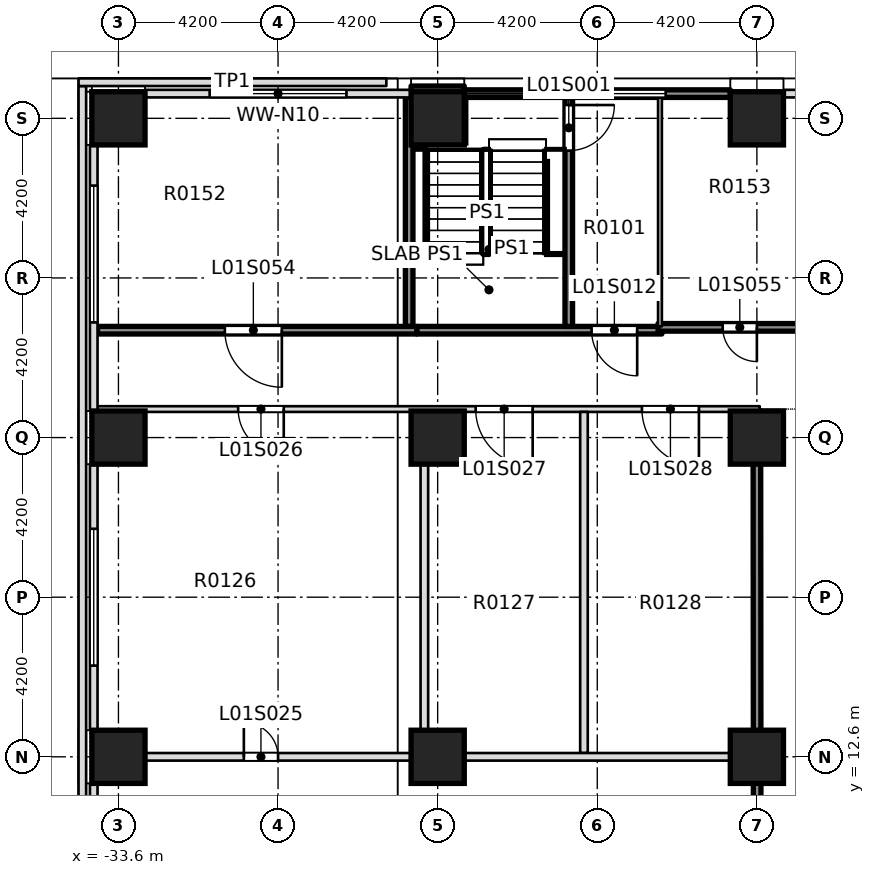
"""IFC4 building model, lengths in metres.
Left out: names, types, materials, properties, quantities, classifications, styles, units other than length and angle.
Written with IfcOpenShell. Run it as: python <this file> out.ifc"""

import sys

from ifc_helpers import new_model, si_unit, direction, frame, frame_2d, origin, origin_2d, place, context, subcontext, project, spatial, rectangle, extrude, element, fill, save


model = new_model("IFC4")
c1 = context("Model", 3, precision=1e-05, world=origin(), true_north=direction((0.0, 1.0)))
c2 = subcontext(c1, "Body", "Model", "MODEL_VIEW")
j1 = project(units=[si_unit("LENGTHUNIT", "METRE"), si_unit("PLANEANGLEUNIT", "RADIAN")], contexts=[c1])
p1 = place(None, origin())
s1 = spatial("IfcSite", under=j1, at=p1, CompositionType="ELEMENT")
p2 = place(p1, origin())
s2 = spatial("IfcBuilding", under=s1, at=p2, CompositionType="ELEMENT")
p3 = place(p2, frame((0.0, 0.0, 7.5)))
s3 = spatial("IfcBuildingStorey", under=s2, at=p3, CompositionType="ELEMENT", Elevation=7.5)
for number, where, z_axis, x_axis in (
    (1, (-25.2, 12.6, -0.4), (0.0, 0.0, 1.0), (1.0, 0.0, 0.0)),
    (2, (-16.8, 12.6, -0.4), (0.0, 0.0, 1.0), (1.0, 0.0, 0.0)),
    (3, (-16.8, 21.0, -0.4), (0.0, 0.0, 1.0), (1.0, 0.0, 0.0)),
):
    element("IfcColumn", number, at=place(p3, frame(where, z_axis=z_axis, x_axis=x_axis)), inside=s3, PredefinedType="COLUMN", context=c2, shape_type="SweptSolid", body=[
        extrude(rectangle(XDim=1.4, YDim=1.4, at=origin_2d()), origin(), (0.0, 0.0, 1.0), 5.0),
    ])
for number, where, z_axis, x_axis in (
    (4, (-33.6, 12.6, 0.0), (0.0, 0.0, 1.0), (1.0, 0.0, 0.0)),
    (5, (-33.6, 21.0, 0.0), (0.0, 0.0, 1.0), (1.0, 0.0, 0.0)),
):
    element("IfcColumn", number, at=place(p3, frame(where, z_axis=z_axis, x_axis=x_axis)), inside=s3, PredefinedType="COLUMN", context=c2, shape_type="SweptSolid", body=[
        extrude(rectangle(XDim=1.4, YDim=1.4, at=origin_2d()), origin(), (0.0, 0.0, 1.0), 4.6),
    ])
p4 = place(p3, frame((-25.2, 21.0, 0.0), z_axis=(0.0, 0.0, 1.0), x_axis=(1.0, 0.0, 0.0)))
e6 = element("IfcColumn", 6, at=p4, inside=s3, PredefinedType="COLUMN", context=c2, shape_type="SweptSolid", body=[
    extrude(rectangle(XDim=1.4, YDim=1.4, at=origin_2d()), origin(), (0.0, 0.0, 1.0), 5.0),
])
p5 = place(p3, frame((-33.6, 29.4, 0.0), z_axis=(0.0, 0.0, 1.0), x_axis=(1.0, 0.0, 0.0)))
e7 = element("IfcColumn", 7, at=p5, inside=s3, PredefinedType="COLUMN", context=c2, shape_type="SweptSolid", body=[
    extrude(rectangle(XDim=1.4, YDim=1.4, at=origin_2d()), origin(), (0.0, 0.0, 1.0), 4.6),
])
for number, where, z_axis, x_axis in (
    (8, (-25.2, 29.4, 0.0), (0.0, 0.0, 1.0), (1.0, 0.0, 0.0)),
    (9, (-16.8, 29.4, 0.0), (0.0, 0.0, 1.0), (1.0, 0.0, 0.0)),
):
    element("IfcColumn", number, at=place(p3, frame(where, z_axis=z_axis, x_axis=x_axis)), inside=s3, PredefinedType="COLUMN", context=c2, shape_type="SweptSolid", body=[
        extrude(rectangle(XDim=1.4, YDim=1.4, at=origin_2d()), origin(), (0.0, 0.0, 1.0), 5.0),
    ])
p6 = place(p3, frame((-34.55, -30.25, 5.0), z_axis=(0.0, 0.0, 1.0), x_axis=(0.0, 1.0, 0.0)))
e10 = element("IfcWall", 10, at=p6, inside=s3, PredefinedType="PARAPET", context=c2, shape_type="SweptSolid", body=[
    extrude(rectangle(XDim=60.5, YDim=0.2, at=frame_2d((30.25, 0.0))), origin(), (0.0, 0.0, 1.0), 1.2),
])
p7 = place(p3, frame((-34.65, 30.35, 5.0), z_axis=(0.0, 0.0, 1.0), x_axis=(1.0, 0.0, 0.0)))
e11 = element("IfcWall", 11, at=p7, inside=s3, PredefinedType="PARAPET", context=c2, shape_type="SweptSolid", body=[
    extrude(rectangle(XDim=8.1, YDim=0.2, at=frame_2d((4.05, 0.0))), origin(), (0.0, 0.0, 1.0), 1.2),
])
p8 = place(p3, frame((-34.15, 12.6, 0.0), z_axis=(0.0, 0.0, 1.0), x_axis=(1.0, 0.0, 0.0)))
e12 = element("IfcWall", 12, at=p8, inside=s3, PredefinedType="PARTITIONING", context=c2, shape_type="SweptSolid", body=[
    extrude(rectangle(XDim=1.25, YDim=0.2, at=frame_2d((0.625, 0.0))), origin(), (0.0, 0.0, 1.0), 4.6),
])
p9 = place(p3, frame((-34.15, 21.75, 0.0), z_axis=(0.0, 0.0, 1.0), x_axis=(1.0, 0.0, 0.0)))
e13 = element("IfcWall", 13, at=p9, inside=s3, PredefinedType="PARTITIONING", context=c2, shape_type="SweptSolid", body=[
    extrude(rectangle(XDim=17.425, YDim=0.15, at=frame_2d((8.712, 0.0))), origin(), (0.0, 0.0, 1.0), 4.6),
])
p10 = place(p9, frame((3.7, 0.0, 0.0)))
e14 = element("IfcOpeningElement", 14, at=p10, cuts=e13, PredefinedType="OPENING", context=c2, shape_type="SweptSolid", body=[
    extrude(rectangle(XDim=1.2, YDim=2.1, at=frame_2d((0.6, 1.05))), frame((0.0, 0.085, 0.0), z_axis=(0.0, -1.0, 0.0), x_axis=(1.0, 0.0, 0.0)), (0.0, 0.0, 1.0), 0.17),
])
p11 = place(p9, frame((9.95, 0.0, 0.0)))
e15 = element("IfcOpeningElement", 15, at=p11, cuts=e13, PredefinedType="OPENING", context=c2, shape_type="SweptSolid", body=[
    extrude(rectangle(XDim=1.5, YDim=2.1, at=frame_2d((0.75, 1.05))), frame((0.0, 0.085, 0.0), z_axis=(0.0, -1.0, 0.0), x_axis=(1.0, 0.0, 0.0)), (0.0, 0.0, 1.0), 0.17),
])
p12 = place(p9, frame((14.325, 0.0, 0.0)))
e16 = element("IfcOpeningElement", 16, at=p12, cuts=e13, PredefinedType="OPENING", context=c2, shape_type="SweptSolid", body=[
    extrude(rectangle(XDim=1.5, YDim=2.1, at=frame_2d((0.75, 1.05))), frame((0.0, 0.085, 0.0), z_axis=(0.0, -1.0, 0.0), x_axis=(1.0, 0.0, 0.0)), (0.0, 0.0, 1.0), 0.17),
])
p13 = place(p3, frame((-25.75, 23.825, 0.0), z_axis=(0.0, 0.0, 1.0), x_axis=(1.0, 0.0, 0.0)))
e17 = element("IfcWall", 17, at=p13, inside=s3, PredefinedType="SOLIDWALL", context=c2, shape_type="SweptSolid", body=[
    extrude(rectangle(XDim=6.45, YDim=0.2, at=frame_2d((3.225, 0.0))), origin(), (0.0, 0.0, 1.0), 4.6),
])
p14 = place(p13, frame((4.6, 0.0, 0.0)))
e18 = element("IfcOpeningElement", 18, at=p14, cuts=e17, PredefinedType="OPENING", context=c2, shape_type="SweptSolid", body=[
    extrude(rectangle(XDim=1.2, YDim=2.1, at=frame_2d((0.6, 1.05))), frame((0.0, 0.11, 0.0), z_axis=(0.0, -1.0, 0.0), x_axis=(1.0, 0.0, 0.0)), (0.0, 0.0, 1.0), 0.22),
])
p15 = place(p3, frame((-19.4, 23.9, 0.0), z_axis=(0.0, 0.0, 1.0), x_axis=(1.0, 0.0, 0.0)))
e19 = element("IfcWall", 19, at=p15, inside=s3, PredefinedType="SOLIDWALL", context=c2, shape_type="SweptSolid", body=[
    extrude(rectangle(XDim=4.3, YDim=0.2, at=frame_2d((2.15, 0.0))), origin(), (0.0, 0.0, 1.0), 4.6),
])
p16 = place(p15, frame((1.7, 0.0, 0.0)))
e20 = element("IfcOpeningElement", 20, at=p16, cuts=e19, PredefinedType="OPENING", context=c2, shape_type="SweptSolid", body=[
    extrude(rectangle(XDim=0.9, YDim=2.1, at=frame_2d((0.45, 1.05))), frame((0.0, 0.11, 0.0), z_axis=(0.0, -1.0, 0.0), x_axis=(1.0, 0.0, 0.0)), (0.0, 0.0, 1.0), 0.22),
])
p17 = place(p3, frame((-25.55, 12.7, 0.0), z_axis=(0.0, 0.0, 1.0), x_axis=(0.0, 1.0, 0.0)))
e21 = element("IfcWall", 21, at=p17, inside=s3, PredefinedType="PARTITIONING", context=c2, shape_type="SweptSolid", body=[
    extrude(rectangle(XDim=8.975, YDim=0.2, at=frame_2d((4.488, 0.0))), origin(), (0.0, 0.0, 1.0), 4.6),
])
p18 = place(p3, frame((-21.75, 23.925, 0.0), z_axis=(0.0, 0.0, 1.0), x_axis=(0.0, 1.0, 0.0)))
e22 = element("IfcWall", 22, at=p18, inside=s3, PredefinedType="SOLIDWALL", context=c2, shape_type="SweptSolid", body=[
    extrude(rectangle(XDim=6.025, YDim=0.2, at=frame_2d((3.012, 0.0))), origin(), (0.0, 0.0, 1.0), 4.6),
])
p19 = place(p18, frame((4.625, 0.0, 0.0)))
e23 = element("IfcOpeningElement", 23, at=p19, cuts=e22, PredefinedType="OPENING", context=c2, shape_type="SweptSolid", body=[
    extrude(rectangle(XDim=1.2, YDim=2.1, at=frame_2d((0.6, 1.05))), frame((0.0, 0.11, 0.0), z_axis=(0.0, -1.0, 0.0), x_axis=(1.0, 0.0, 0.0)), (0.0, 0.0, 1.0), 0.22),
])
p20 = place(p3, frame((-21.35, 12.7, 0.0), z_axis=(0.0, 0.0, 1.0), x_axis=(0.0, 1.0, 0.0)))
e24 = element("IfcWall", 24, at=p20, inside=s3, PredefinedType="PARTITIONING", context=c2, shape_type="SweptSolid", body=[
    extrude(rectangle(XDim=8.975, YDim=0.2, at=frame_2d((4.488, 0.0))), origin(), (0.0, 0.0, 1.0), 4.6),
])
p21 = place(p3, frame((-19.35, 23.925, 0.0), z_axis=(0.0, 0.0, 1.0), x_axis=(0.0, 1.0, 0.0)))
e25 = element("IfcWall", 25, at=p21, inside=s3, PredefinedType="PARTITIONING", context=c2, shape_type="SweptSolid", body=[
    extrude(rectangle(XDim=6.025, YDim=0.1, at=frame_2d((3.012, 0.0))), origin(), (0.0, 0.0, 1.0), 4.6),
])
p22 = place(p3, frame((-16.775, -12.525, 0.0), z_axis=(0.0, 0.0, 1.0), x_axis=(-0.000727609751, 0.999999735292, 0.0)))
e26 = element("IfcWall", 26, at=p22, inside=s3, PredefinedType="SOLIDWALL", context=c2, shape_type="SweptSolid", body=[
    extrude(rectangle(XDim=34.225, YDim=0.2, at=frame_2d((17.112, 0.0))), origin(), (0.0, 0.0, 1.0), 4.6),
])
p23 = place(p22, frame((16.225, 0.0, 0.0)))
e27 = element("IfcOpeningElement", 27, at=p23, cuts=e26, PredefinedType="OPENING", context=c2, shape_type="SweptSolid", body=[
    extrude(rectangle(XDim=1.5, YDim=2.1, at=frame_2d((0.75, 1.05))), frame((0.0, 0.11, 0.0), z_axis=(0.0, -1.0, 0.0), x_axis=(1.0, 0.0, 0.0)), (0.0, 0.0, 1.0), 0.22),
])
p24 = place(p3, frame((-9.1, 30.05, 0.0), z_axis=(0.0, 0.0, 1.0), x_axis=(-1.0, 0.0, 0.0)))
e28 = element("IfcWall", 28, at=p24, inside=s3, PredefinedType="STANDARD", context=c2, shape_type="SweptSolid", body=[
    extrude(rectangle(XDim=7.0, YDim=0.2, at=frame_2d((3.5, 0.0))), origin(), (0.0, 0.0, 1.0), 4.6),
])
p25 = place(p24, frame((2.07, 0.0, 0.9)))
e29 = element("IfcOpeningElement", 29, at=p25, cuts=e28, PredefinedType="OPENING", context=c2, shape_type="SweptSolid", body=[
    extrude(rectangle(XDim=3.6, YDim=2.8, at=frame_2d((1.8, 1.4))), frame((0.0, 0.11, 0.0), z_axis=(0.0, -1.0, 0.0), x_axis=(1.0, 0.0, 0.0)), (0.0, 0.0, 1.0), 0.22),
])
p26 = place(p3, frame((-24.5, 30.05, 0.0), z_axis=(0.0, 0.0, 1.0), x_axis=(1.0, 0.0, 0.0)))
e30 = element("IfcWall", 30, at=p26, inside=s3, PredefinedType="SOLIDWALL", context=c2, shape_type="SweptSolid", body=[
    extrude(rectangle(XDim=7.0, YDim=0.2, at=frame_2d((3.5, 0.0))), origin(), (0.0, 0.0, 1.0), 4.6),
])
p27 = place(p26, frame((1.7, 0.0, 0.9)))
e31 = element("IfcOpeningElement", 31, at=p27, cuts=e30, PredefinedType="OPENING", context=c2, shape_type="SweptSolid", body=[
    extrude(rectangle(XDim=3.6, YDim=2.8, at=frame_2d((1.8, 1.4))), frame((0.0, 0.11, 0.0), z_axis=(0.0, -1.0, 0.0), x_axis=(1.0, 0.0, 0.0)), (0.0, 0.0, 1.0), 0.22),
])
p28 = place(p3, frame((-25.9, 30.05, 0.0), z_axis=(0.0, 0.0, 1.0), x_axis=(-1.0, 0.0, 0.0)))
e32 = element("IfcWall", 32, at=p28, inside=s3, PredefinedType="STANDARD", context=c2, shape_type="SweptSolid", body=[
    extrude(rectangle(XDim=7.0, YDim=0.2, at=frame_2d((3.5, 0.0))), origin(), (0.0, 0.0, 1.0), 4.6),
])
p29 = place(p28, frame((1.7, 0.0, 0.9)))
e33 = element("IfcOpeningElement", 33, at=p29, cuts=e32, PredefinedType="OPENING", context=c2, shape_type="SweptSolid", body=[
    extrude(rectangle(XDim=3.6, YDim=2.8, at=frame_2d((1.8, 1.4))), frame((0.0, 0.11, 0.0), z_axis=(0.0, -1.0, 0.0), x_axis=(1.0, 0.0, 0.0)), (0.0, 0.0, 1.0), 0.22),
])
p30 = place(p3, frame((-34.25, 28.7, 0.0), z_axis=(0.0, 0.0, 1.0), x_axis=(0.0, -1.0, 0.0)))
e34 = element("IfcWall", 34, at=p30, inside=s3, PredefinedType="STANDARD", context=c2, shape_type="SweptSolid", body=[
    extrude(rectangle(XDim=7.0, YDim=0.2, at=frame_2d((3.5, 0.0))), origin(), (0.0, 0.0, 1.0), 4.6),
])
p31 = place(p30, frame((1.07, 0.0, 0.9)))
e35 = element("IfcOpeningElement", 35, at=p31, cuts=e34, PredefinedType="OPENING", context=c2, shape_type="SweptSolid", body=[
    extrude(rectangle(XDim=3.6, YDim=2.8, at=frame_2d((1.8, 1.4))), frame((0.0, 0.11, 0.0), z_axis=(0.0, -1.0, 0.0), x_axis=(1.0, 0.0, 0.0)), (0.0, 0.0, 1.0), 0.22),
])
p32 = place(p3, frame((-34.25, 20.3, 0.0), z_axis=(0.0, 0.0, 1.0), x_axis=(0.0, -1.0, 0.0)))
e36 = element("IfcWall", 36, at=p32, inside=s3, PredefinedType="STANDARD", context=c2, shape_type="SweptSolid", body=[
    extrude(rectangle(XDim=7.0, YDim=0.2, at=frame_2d((3.5, 0.0))), origin(), (0.0, 0.0, 1.0), 4.6),
])
p33 = place(p32, frame((1.7, 0.0, 0.9)))
e37 = element("IfcOpeningElement", 37, at=p33, cuts=e36, PredefinedType="OPENING", context=c2, shape_type="SweptSolid", body=[
    extrude(rectangle(XDim=3.6, YDim=2.8, at=frame_2d((1.8, 1.4))), frame((0.0, 0.11, 0.0), z_axis=(0.0, -1.0, 0.0), x_axis=(1.0, 0.0, 0.0)), (0.0, 0.0, 1.0), 0.22),
])
p34 = place(p3, frame((-34.25, 11.9, 0.0), z_axis=(0.0, 0.0, 1.0), x_axis=(0.0, -1.0, 0.0)))
e38 = element("IfcWall", 38, at=p34, inside=s3, PredefinedType="STANDARD", context=c2, shape_type="SweptSolid", body=[
    extrude(rectangle(XDim=7.0, YDim=0.2, at=frame_2d((3.5, 0.0))), origin(), (0.0, 0.0, 1.0), 4.6),
])
p35 = place(p34, frame((1.7, 0.0, 0.9)))
e39 = element("IfcOpeningElement", 39, at=p35, cuts=e38, PredefinedType="OPENING", context=c2, shape_type="SweptSolid", body=[
    extrude(rectangle(XDim=3.6, YDim=2.8, at=frame_2d((1.8, 1.4))), frame((0.0, 0.11, 0.0), z_axis=(0.0, -1.0, 0.0), x_axis=(1.0, 0.0, 0.0)), (0.0, 0.0, 1.0), 0.22),
])
p36 = place(p3, frame((-25.9, 30.15, 0.0), z_axis=(0.0, 0.0, 1.0), x_axis=(1.0, 0.0, 0.0)))
e40 = element("IfcWall", 40, at=p36, inside=s3, PredefinedType="SOLIDWALL", context=c2, shape_type="SweptSolid", body=[
    extrude(rectangle(XDim=1.4, YDim=0.2, at=frame_2d((0.7, 0.0))), origin(), (0.0, 0.0, 1.0), 4.6),
])
p37 = place(p3, frame((-25.95, 23.925, 0.0), z_axis=(0.0, 0.0, 1.0), x_axis=(0.0, 1.0, 0.0)))
e41 = element("IfcWall", 41, at=p37, inside=s3, PredefinedType="SOLIDWALL", context=c2, shape_type="SweptSolid", body=[
    extrude(rectangle(XDim=6.025, YDim=0.2, at=frame_2d((3.012, 0.0))), origin(), (0.0, 0.0, 1.0), 4.6),
])
p38 = place(p3, frame((-34.15, 23.825, 0.0), z_axis=(0.0, 0.0, 1.0), x_axis=(1.0, 0.0, 0.0)))
e42 = element("IfcWall", 42, at=p38, inside=s3, PredefinedType="SOLIDWALL", context=c2, shape_type="SweptSolid", body=[
    extrude(rectangle(XDim=8.4, YDim=0.2, at=frame_2d((4.2, 0.0))), origin(), (0.0, 0.0, 1.0), 4.6),
])
p39 = place(p38, frame((3.35, 0.0, 0.0)))
e43 = element("IfcOpeningElement", 43, at=p39, cuts=e42, PredefinedType="OPENING", context=c2, shape_type="SweptSolid", body=[
    extrude(rectangle(XDim=1.5, YDim=2.1, at=frame_2d((0.75, 1.05))), frame((0.0, 0.11, 0.0), z_axis=(0.0, -1.0, 0.0), x_axis=(1.0, 0.0, 0.0)), (0.0, 0.0, 1.0), 0.22),
])
p40 = place(p3, frame((-32.9, 12.6, 0.0), z_axis=(0.0, 0.0, 1.0), x_axis=(1.0, 0.0, 0.0)))
e44 = element("IfcWall", 44, at=p40, inside=s3, PredefinedType="PARTITIONING", context=c2, shape_type="SweptSolid", body=[
    extrude(rectangle(XDim=7.0, YDim=0.2, at=frame_2d((3.5, 0.0))), origin(), (0.0, 0.0, 1.0), 3.8),
])
p41 = place(p40, frame((2.6, 0.0, 0.0)))
e45 = element("IfcOpeningElement", 45, at=p41, cuts=e44, PredefinedType="OPENING", context=c2, shape_type="SweptSolid", body=[
    extrude(rectangle(XDim=0.9, YDim=2.1, at=frame_2d((0.45, 1.05))), frame((0.0, 0.11, 0.0), z_axis=(0.0, -1.0, 0.0), x_axis=(1.0, 0.0, 0.0)), (0.0, 0.0, 1.0), 0.22),
])
p42 = place(p3, frame((-25.9, 12.6, 0.0), z_axis=(0.0, 0.0, 1.0), x_axis=(1.0, 0.0, 0.0)))
e46 = element("IfcWall", 46, at=p42, inside=s3, PredefinedType="PARTITIONING", context=c2, shape_type="SweptSolid", body=[
    extrude(rectangle(XDim=9.025, YDim=0.2, at=frame_2d((4.512, 0.0))), origin(), (0.0, 0.0, 1.0), 4.6),
])
p43 = place(p19, origin())
e47 = element("IfcDoor", 47, at=p43, inside=s3, OperationType="DOUBLE_DOOR_SINGLE_SWING", PredefinedType="DOOR", context=c2, shape_type="SweptSolid", body=[
    extrude(rectangle(XDim=1.2, YDim=2.1, at=frame_2d((0.6, 1.05))), frame((0.0, 0.025, 0.0), z_axis=(0.0, -1.0, 0.0), x_axis=(1.0, 0.0, 0.0)), (0.0, 0.0, 1.0), 0.05),
])
fill(e23, e47)
p44 = place(p14, origin())
e48 = element("IfcDoor", 48, at=p44, inside=s3, OperationType="SINGLE_SWING_RIGHT", PredefinedType="DOOR", context=c2, shape_type="SweptSolid", body=[
    extrude(rectangle(XDim=1.2, YDim=2.1, at=frame_2d((0.6, 1.05))), frame((0.0, 0.025, 0.0), z_axis=(0.0, -1.0, 0.0), x_axis=(1.0, 0.0, 0.0)), (0.0, 0.0, 1.0), 0.05),
])
fill(e18, e48)
p45 = place(p41, origin())
e49 = element("IfcDoor", 49, at=p45, inside=s3, OperationType="SINGLE_SWING_LEFT", PredefinedType="DOOR", context=c2, shape_type="SweptSolid", body=[
    extrude(rectangle(XDim=0.9, YDim=2.1, at=frame_2d((0.45, 1.05))), frame((0.0, 0.025, 0.0), z_axis=(0.0, -1.0, 0.0), x_axis=(1.0, 0.0, 0.0)), (0.0, 0.0, 1.0), 0.05),
])
fill(e45, e49)
p46 = place(p10, origin())
e50 = element("IfcDoor", 50, at=p46, inside=s3, OperationType="SINGLE_SWING_RIGHT", PredefinedType="DOOR", context=c2, shape_type="SweptSolid", body=[
    extrude(rectangle(XDim=1.2, YDim=2.1, at=frame_2d((0.6, 1.05))), frame((0.0, 0.025, 0.0), z_axis=(0.0, -1.0, 0.0), x_axis=(1.0, 0.0, 0.0)), (0.0, 0.0, 1.0), 0.05),
])
fill(e14, e50)
p47 = place(p11, origin())
e51 = element("IfcDoor", 51, at=p47, inside=s3, OperationType="DOUBLE_DOOR_SINGLE_SWING", PredefinedType="DOOR", context=c2, shape_type="SweptSolid", body=[
    extrude(rectangle(XDim=1.5, YDim=2.1, at=frame_2d((0.75, 1.05))), frame((0.0, 0.025, 0.0), z_axis=(0.0, -1.0, 0.0), x_axis=(1.0, 0.0, 0.0)), (0.0, 0.0, 1.0), 0.05),
])
fill(e15, e51)
p48 = place(p12, origin())
e52 = element("IfcDoor", 52, at=p48, inside=s3, OperationType="DOUBLE_DOOR_SINGLE_SWING", PredefinedType="DOOR", context=c2, shape_type="SweptSolid", body=[
    extrude(rectangle(XDim=1.5, YDim=2.1, at=frame_2d((0.75, 1.05))), frame((0.0, 0.025, 0.0), z_axis=(0.0, -1.0, 0.0), x_axis=(1.0, 0.0, 0.0)), (0.0, 0.0, 1.0), 0.05),
])
fill(e16, e52)
p49 = place(p39, origin())
e53 = element("IfcDoor", 53, at=p49, inside=s3, OperationType="DOUBLE_DOOR_SINGLE_SWING", PredefinedType="DOOR", context=c2, shape_type="SweptSolid", body=[
    extrude(rectangle(XDim=1.5, YDim=2.1, at=frame_2d((0.75, 1.05))), frame((0.0, 0.025, 0.0), z_axis=(0.0, -1.0, 0.0), x_axis=(1.0, 0.0, 0.0)), (0.0, 0.0, 1.0), 0.05),
])
fill(e43, e53)
p50 = place(p16, origin())
e54 = element("IfcDoor", 54, at=p50, inside=s3, OperationType="SINGLE_SWING_RIGHT", PredefinedType="DOOR", context=c2, shape_type="SweptSolid", body=[
    extrude(rectangle(XDim=0.9, YDim=2.1, at=frame_2d((0.45, 1.05))), frame((0.0, 0.025, 0.0), z_axis=(0.0, -1.0, 0.0), x_axis=(1.0, 0.0, 0.0)), (0.0, 0.0, 1.0), 0.05),
])
fill(e20, e54)
p51 = place(p27, origin())
e55 = element("IfcWindow", 55, at=p51, inside=s3, PartitioningType="SINGLE_PANEL", PredefinedType="WINDOW", context=c2, shape_type="SweptSolid", body=[
    extrude(rectangle(XDim=3.6, YDim=2.8, at=frame_2d((1.8, 1.4))), frame((0.0, 0.03, 0.0), z_axis=(0.0, -1.0, 0.0), x_axis=(1.0, 0.0, 0.0)), (0.0, 0.0, 1.0), 0.06),
])
fill(e31, e55)
p52 = place(p29, origin())
e56 = element("IfcWindow", 56, at=p52, inside=s3, PartitioningType="SINGLE_PANEL", PredefinedType="WINDOW", context=c2, shape_type="SweptSolid", body=[
    extrude(rectangle(XDim=3.6, YDim=2.8, at=frame_2d((1.8, 1.4))), frame((0.0, 0.03, 0.0), z_axis=(0.0, -1.0, 0.0), x_axis=(1.0, 0.0, 0.0)), (0.0, 0.0, 1.0), 0.06),
])
fill(e33, e56)
p53 = place(p31, origin())
e57 = element("IfcWindow", 57, at=p53, inside=s3, PartitioningType="SINGLE_PANEL", PredefinedType="WINDOW", context=c2, shape_type="SweptSolid", body=[
    extrude(rectangle(XDim=3.6, YDim=2.8, at=frame_2d((1.8, 1.4))), frame((0.0, 0.03, 0.0), z_axis=(0.0, -1.0, 0.0), x_axis=(1.0, 0.0, 0.0)), (0.0, 0.0, 1.0), 0.06),
])
fill(e35, e57)
p54 = place(p33, origin())
e58 = element("IfcWindow", 58, at=p54, inside=s3, PartitioningType="SINGLE_PANEL", PredefinedType="WINDOW", context=c2, shape_type="SweptSolid", body=[
    extrude(rectangle(XDim=3.6, YDim=2.8, at=frame_2d((1.8, 1.4))), frame((0.0, 0.03, 0.0), z_axis=(0.0, -1.0, 0.0), x_axis=(1.0, 0.0, 0.0)), (0.0, 0.0, 1.0), 0.06),
])
fill(e37, e58)
save(model, sys.argv[1])
